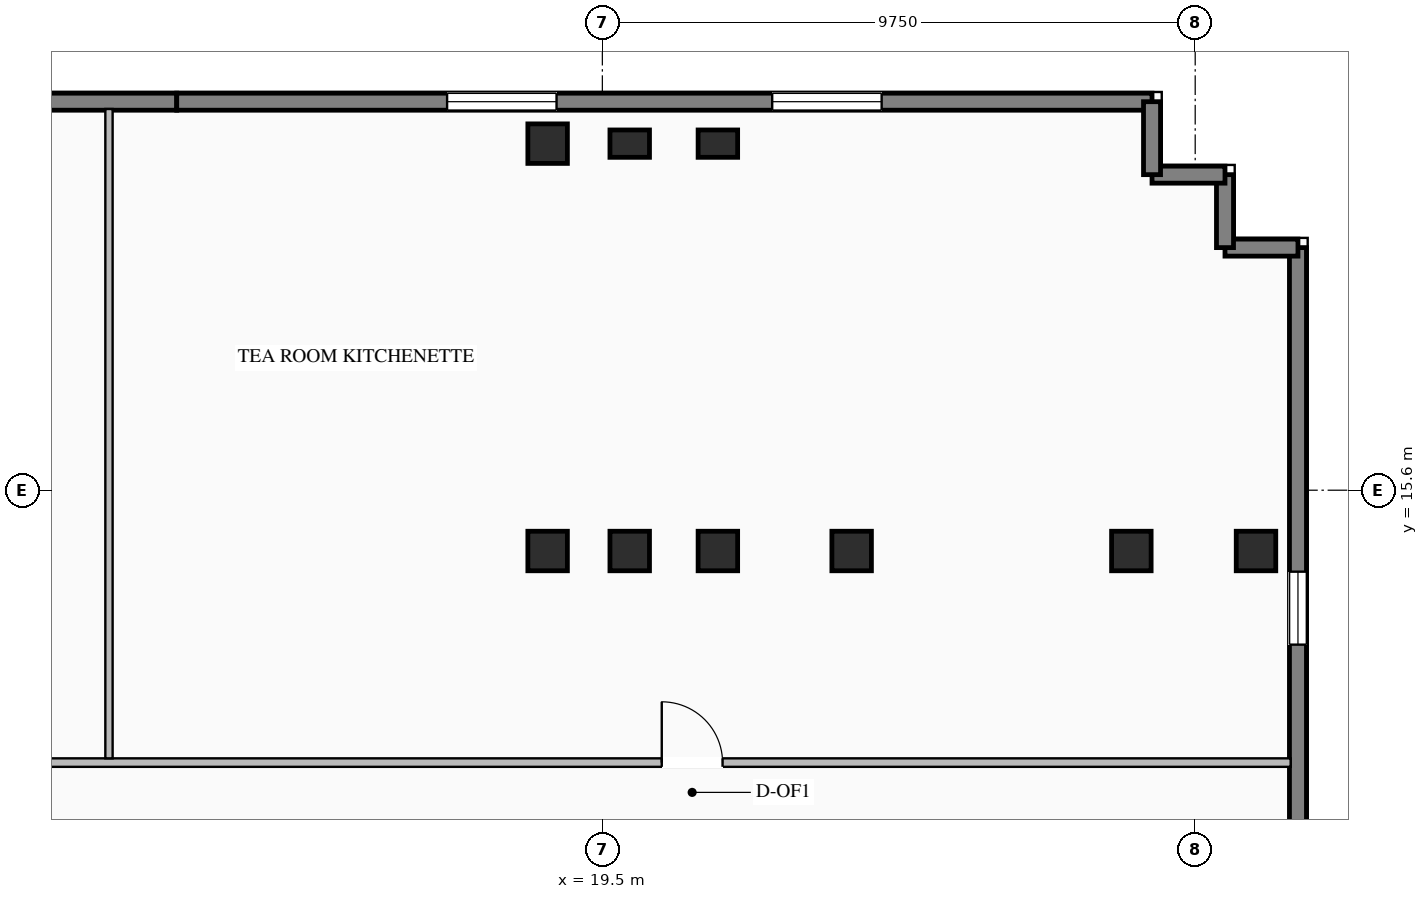
"""IFC4 building model, lengths in metres.
Left out: names, types, materials, properties, quantities, classifications, styles, units other than length and angle.
Written with IfcOpenShell. Run it as: python <this file> out.ifc"""

import sys

from ifc_helpers import new_model, si_unit, direction, frame, frame_2d, origin, origin_2d, place, context, subcontext, project, spatial, rectangle, i_section, extrude, element, fill, save


model = new_model("IFC4")
c1 = context("Model", 3, precision=1e-05, world=origin(), true_north=direction((0.0, 1.0)))
c2 = subcontext(c1, "Body", "Model", "MODEL_VIEW")
j1 = project(units=[si_unit("LENGTHUNIT", "METRE"), si_unit("PLANEANGLEUNIT", "RADIAN")], contexts=[c1])
p1 = place(None, origin())
s1 = spatial("IfcSite", under=j1, at=p1, CompositionType="ELEMENT")
p2 = place(p1, origin())
s2 = spatial("IfcBuilding", under=s1, at=p2, CompositionType="ELEMENT")
p3 = place(p2, frame((0.0, 0.0, 120.85)))
s3 = spatial("IfcBuildingStorey", under=s2, at=p3, CompositionType="ELEMENT", Elevation=120.85)
for number, where, z_axis, x_axis in (
    (1, (18.6, 14.6, 0.0), (0.0, 0.0, 1.0), (1.0, 0.0, 0.0)),
    (2, (19.95, 14.6, 0.0), (0.0, 0.0, 1.0), (1.0, 0.0, 0.0)),
    (3, (21.4, 14.6, 0.0), (0.0, 0.0, 1.0), (1.0, 0.0, 0.0)),
    (4, (23.6, 14.6, 0.0), (0.0, 0.0, 1.0), (1.0, 0.0, 0.0)),
    (5, (28.2, 14.6, 0.0), (0.0, 0.0, 1.0), (1.0, 0.0, 0.0)),
    (6, (18.6, 21.3, 0.0), (0.0, 0.0, 1.0), (1.0, 0.0, 0.0)),
    (7, (30.25, 14.6, 0.0), (0.0, 0.0, 1.0), (1.0, 0.0, 0.0)),
):
    element("IfcColumn", number, at=place(p3, frame(where, z_axis=z_axis, x_axis=x_axis)), inside=s3, PredefinedType="COLUMN", context=c2, shape_type="SweptSolid", body=[
        extrude(i_section(OverallWidth=0.65, OverallDepth=0.65, WebThickness=0.028, FlangeThickness=0.04, at=origin_2d()), origin(), (0.0, 0.0, 1.0), 3.45),
    ])
for number, where, z_axis, x_axis in (
    (8, (19.95, 21.3, 0.0), (0.0, 0.0, 1.0), (1.0, 0.0, 0.0)),
    (9, (21.4, 21.3, 0.0), (0.0, 0.0, 1.0), (1.0, 0.0, 0.0)),
):
    element("IfcColumn", number, at=place(p3, frame(where, z_axis=z_axis, x_axis=x_axis)), inside=s3, PredefinedType="PILASTER", context=c2, shape_type="SweptSolid", body=[
        extrude(rectangle(XDim=0.65, YDim=0.45, at=origin_2d()), origin(), (0.0, 0.0, 1.0), 3.45),
    ])
p4 = place(p3, frame((3.5, 21.99, 0.0), z_axis=(0.0, 0.0, 1.0), x_axis=(1.0, 0.0, 0.0)))
e10 = element("IfcWall", 10, at=p4, inside=s3, PredefinedType="STANDARD", context=c2, shape_type="SweptSolid", body=[
    extrude(rectangle(XDim=9.0, YDim=0.28, at=frame_2d((4.5, 0.0))), origin(), (0.0, 0.0, 1.0), 3.25),
])
p5 = place(p4, frame((2.1, 0.0, 0.76)))
e11 = element("IfcOpeningElement", 11, at=p5, cuts=e10, PredefinedType="OPENING", context=c2, shape_type="SweptSolid", body=[
    extrude(rectangle(XDim=1.8, YDim=1.95, at=frame_2d((0.9, 0.975))), frame((0.0, 0.15, 0.0), z_axis=(0.0, -1.0, 0.0), x_axis=(1.0, 0.0, 0.0)), (0.0, 0.0, 1.0), 0.3),
])
p6 = place(p4, frame((5.1, 0.0, 0.76)))
e12 = element("IfcOpeningElement", 12, at=p6, cuts=e10, PredefinedType="OPENING", context=c2, shape_type="SweptSolid", body=[
    extrude(rectangle(XDim=1.8, YDim=1.95, at=frame_2d((0.9, 0.975))), frame((0.0, 0.15, 0.0), z_axis=(0.0, -1.0, 0.0), x_axis=(1.0, 0.0, 0.0)), (0.0, 0.0, 1.0), 0.3),
])
p7 = place(p3, frame((12.5, 21.99, 0.0), z_axis=(0.0, 0.0, 1.0), x_axis=(1.0, 0.0, 0.0)))
e13 = element("IfcWall", 13, at=p7, inside=s3, PredefinedType="STANDARD", context=c2, shape_type="SweptSolid", body=[
    extrude(rectangle(XDim=16.04, YDim=0.28, at=frame_2d((8.02, 0.0))), origin(), (0.0, 0.0, 1.0), 3.25),
])
p8 = place(p7, frame((4.447, 0.0, 0.76)))
e14 = element("IfcOpeningElement", 14, at=p8, cuts=e13, PredefinedType="OPENING", context=c2, shape_type="SweptSolid", body=[
    extrude(rectangle(XDim=1.8, YDim=1.95, at=frame_2d((0.9, 0.975))), frame((0.0, 0.15, 0.0), z_axis=(0.0, -1.0, 0.0), x_axis=(1.0, 0.0, 0.0)), (0.0, 0.0, 1.0), 0.3),
])
p9 = place(p7, frame((9.793, 0.0, 0.76)))
e15 = element("IfcOpeningElement", 15, at=p9, cuts=e13, PredefinedType="OPENING", context=c2, shape_type="SweptSolid", body=[
    extrude(rectangle(XDim=1.8, YDim=1.95, at=frame_2d((0.9, 0.975))), frame((0.0, 0.15, 0.0), z_axis=(0.0, -1.0, 0.0), x_axis=(1.0, 0.0, 0.0)), (0.0, 0.0, 1.0), 0.3),
])
p10 = place(p3, frame((30.94, 19.59, 0.0), z_axis=(0.0, 0.0, 1.0), x_axis=(0.0, -1.0, 0.0)))
e16 = element("IfcWall", 16, at=p10, inside=s3, PredefinedType="STANDARD", context=c2, shape_type="SweptSolid", body=[
    extrude(rectangle(XDim=17.79, YDim=0.28, at=frame_2d((8.895, 0.0))), origin(), (0.0, 0.0, 1.0), 3.25),
])
p11 = place(p10, frame((5.33, 0.0, 0.76)))
e17 = element("IfcOpeningElement", 17, at=p11, cuts=e16, PredefinedType="OPENING", context=c2, shape_type="SweptSolid", body=[
    extrude(rectangle(XDim=1.2, YDim=1.95, at=frame_2d((0.6, 0.975))), frame((0.0, 0.15, 0.0), z_axis=(0.0, -1.0, 0.0), x_axis=(1.0, 0.0, 0.0)), (0.0, 0.0, 1.0), 0.3),
])
p12 = place(p10, frame((11.26, 0.0, 0.76)))
e18 = element("IfcOpeningElement", 18, at=p12, cuts=e16, PredefinedType="OPENING", context=c2, shape_type="SweptSolid", body=[
    extrude(rectangle(XDim=1.2, YDim=1.95, at=frame_2d((0.6, 0.975))), frame((0.0, 0.15, 0.0), z_axis=(0.0, -1.0, 0.0), x_axis=(1.0, 0.0, 0.0)), (0.0, 0.0, 1.0), 0.3),
])
for number, where, z_axis, x_axis in (
    (19, (30.94, 19.59, 0.0), (0.0, 0.0, 1.0), (-1.0, 0.0, 0.0)),
    (20, (29.74, 19.59, 0.0), (0.0, 0.0, 1.0), (0.0, 1.0, 0.0)),
    (21, (29.74, 20.79, 0.0), (0.0, 0.0, 1.0), (-1.0, 0.0, 0.0)),
    (22, (28.54, 20.79, 0.0), (0.0, 0.0, 1.0), (0.0, 1.0, 0.0)),
):
    element("IfcWall", number, at=place(p3, frame(where, z_axis=z_axis, x_axis=x_axis)), inside=s3, PredefinedType="STANDARD", context=c2, shape_type="SweptSolid", body=[
        extrude(rectangle(XDim=1.2, YDim=0.28, at=frame_2d((0.6, 0.0))), origin(), (0.0, 0.0, 1.0), 3.25),
    ])
p13 = place(p3, frame((-32.82, 11.12, 0.0), z_axis=(0.0, 0.0, 1.0), x_axis=(1.0, 0.0, 0.0)))
e23 = element("IfcWall", 23, at=p13, inside=s3, PredefinedType="STANDARD", context=c2, shape_type="SweptSolid", body=[
    extrude(rectangle(XDim=63.64, YDim=0.14, at=frame_2d((31.82, 0.0))), origin(), (0.0, 0.0, 1.0), 3.25),
])
p14 = place(p13, frame((9.66, 0.0, 0.0)))
e24 = element("IfcOpeningElement", 24, at=p14, cuts=e23, PredefinedType="OPENING", context=c2, shape_type="SweptSolid", body=[
    extrude(rectangle(XDim=1.0, YDim=2.08, at=frame_2d((0.5, 1.04))), frame((0.0, 0.08, 0.0), z_axis=(0.0, -1.0, 0.0), x_axis=(1.0, 0.0, 0.0)), (0.0, 0.0, 1.0), 0.16),
])
p15 = place(p13, frame((31.637, 0.0, 0.0)))
e25 = element("IfcOpeningElement", 25, at=p15, cuts=e23, PredefinedType="OPENING", context=c2, shape_type="SweptSolid", body=[
    extrude(rectangle(XDim=1.0, YDim=2.08, at=frame_2d((0.5, 1.04))), frame((0.0, 0.08, 0.0), z_axis=(0.0, -1.0, 0.0), x_axis=(1.0, 0.0, 0.0)), (0.0, 0.0, 1.0), 0.16),
])
p16 = place(p13, frame((53.297, 0.0, 0.0)))
e26 = element("IfcOpeningElement", 26, at=p16, cuts=e23, PredefinedType="OPENING", context=c2, shape_type="SweptSolid", body=[
    extrude(rectangle(XDim=1.0, YDim=2.08, at=frame_2d((0.5, 1.04))), frame((0.0, 0.08, 0.0), z_axis=(0.0, -1.0, 0.0), x_axis=(1.0, 0.0, 0.0)), (0.0, 0.0, 1.0), 0.16),
])
p17 = place(p3, frame((11.386, 11.19, 0.0), z_axis=(0.0, 0.0, 1.0), x_axis=(0.0, 1.0, 0.0)))
e27 = element("IfcWall", 27, at=p17, inside=s3, PredefinedType="STANDARD", context=c2, shape_type="SweptSolid", body=[
    extrude(rectangle(XDim=10.68, YDim=0.12, at=frame_2d((5.34, 0.0))), origin(), (0.0, 0.0, 1.0), 3.25),
])
p18 = place(p8, origin())
e28 = element("IfcWindow", 28, at=p18, inside=s3, PartitioningType="SINGLE_PANEL", PredefinedType="WINDOW", context=c2, shape_type="SweptSolid", body=[
    extrude(rectangle(XDim=1.8, YDim=1.95, at=frame_2d((0.9, 0.975))), frame((0.0, 0.03, 0.0), z_axis=(0.0, -1.0, 0.0), x_axis=(1.0, 0.0, 0.0)), (0.0, 0.0, 1.0), 0.06),
])
fill(e14, e28)
p19 = place(p9, origin())
e29 = element("IfcWindow", 29, at=p19, inside=s3, PartitioningType="SINGLE_PANEL", PredefinedType="WINDOW", context=c2, shape_type="SweptSolid", body=[
    extrude(rectangle(XDim=1.8, YDim=1.95, at=frame_2d((0.9, 0.975))), frame((0.0, 0.03, 0.0), z_axis=(0.0, -1.0, 0.0), x_axis=(1.0, 0.0, 0.0)), (0.0, 0.0, 1.0), 0.06),
])
fill(e15, e29)
p20 = place(p11, origin())
e30 = element("IfcWindow", 30, at=p20, inside=s3, PartitioningType="SINGLE_PANEL", PredefinedType="WINDOW", context=c2, shape_type="SweptSolid", body=[
    extrude(rectangle(XDim=1.2, YDim=1.95, at=frame_2d((0.6, 0.975))), frame((0.0, 0.03, 0.0), z_axis=(0.0, -1.0, 0.0), x_axis=(1.0, 0.0, 0.0)), (0.0, 0.0, 1.0), 0.06),
])
fill(e17, e30)
p21 = place(p16, origin())
e31 = element("IfcDoor", 31, at=p21, inside=s3, OperationType="SINGLE_SWING_LEFT", PredefinedType="DOOR", context=c2, shape_type="SweptSolid", body=[
    extrude(rectangle(XDim=1.0, YDim=2.08, at=frame_2d((0.5, 1.04))), frame((0.0, 0.025, 0.0), z_axis=(0.0, -1.0, 0.0), x_axis=(1.0, 0.0, 0.0)), (0.0, 0.0, 1.0), 0.05),
])
fill(e26, e31)
save(model, sys.argv[1])
